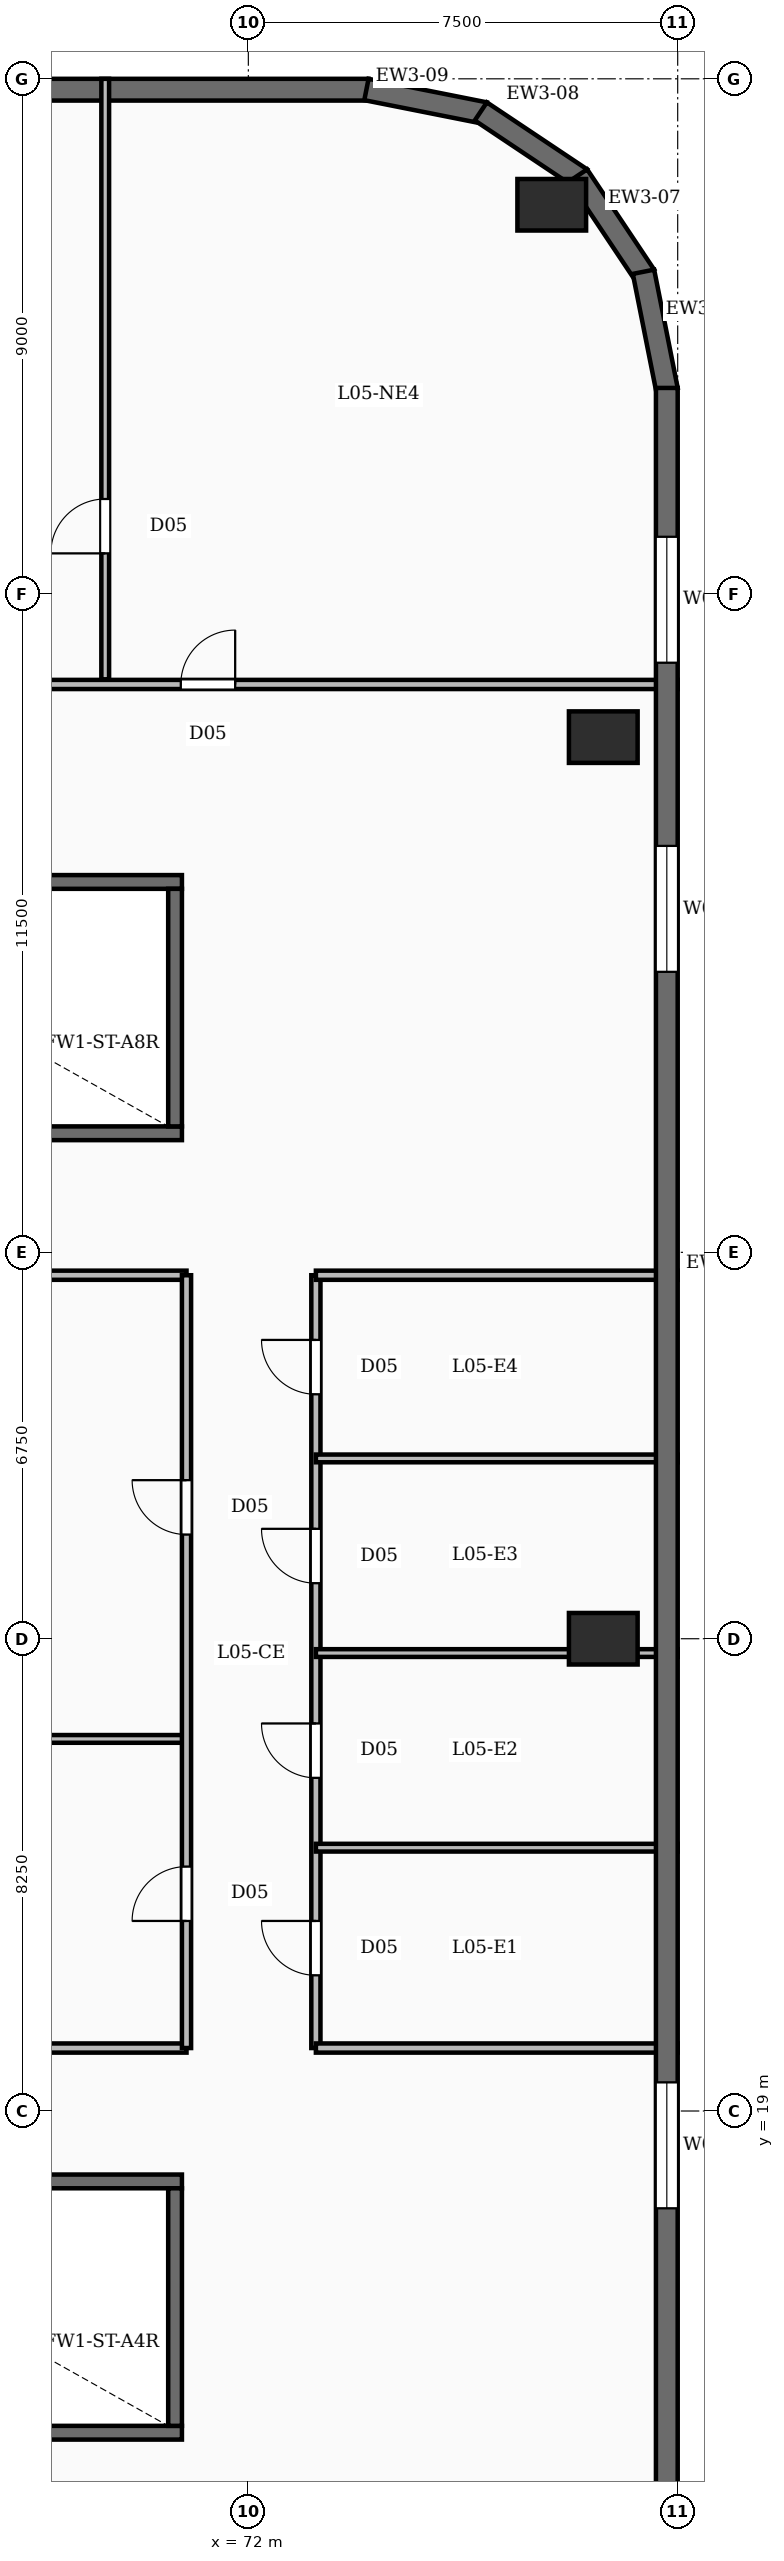
"""IFC4 building model, lengths in metres.
Left out: names, types, materials, properties, quantities, classifications, styles, units other than length and angle.
Written with IfcOpenShell. Run it as: python <this file> out.ifc"""

import sys

from ifc_helpers import new_model, si_unit, direction, frame, frame_2d, origin, origin_2d, place, context, subcontext, project, spatial, rectangle, extrude, element, fill, save


model = new_model("IFC4")
c1 = context("Model", 3, precision=1e-05, world=origin(), true_north=direction((0.0, 1.0)))
c2 = subcontext(c1, "Body", "Model", "MODEL_VIEW")
j1 = project(units=[si_unit("LENGTHUNIT", "METRE"), si_unit("PLANEANGLEUNIT", "RADIAN")], contexts=[c1])
p1 = place(None, origin())
s1 = spatial("IfcSite", under=j1, at=p1, CompositionType="ELEMENT")
p2 = place(p1, origin())
s2 = spatial("IfcBuilding", under=s1, at=p2, CompositionType="ELEMENT")
p3 = place(p2, frame((0.0, 0.0, 28.0)))
s3 = spatial("IfcBuildingStorey", under=s2, at=p3, CompositionType="ELEMENT", Elevation=28.0)
for number, where, z_axis, x_axis in (
    (1, (78.2, 27.25, -0.35), (0.0, 0.0, 1.0), (1.0, 0.0, 0.0)),
    (2, (78.2, 43.0, -0.35), (0.0, 0.0, 1.0), (1.0, 0.0, 0.0)),
    (3, (77.3, 52.3, -0.35), (0.0, 0.0, 1.0), (1.0, 0.0, 0.0)),
):
    element("IfcColumn", number, at=place(p3, frame(where, z_axis=z_axis, x_axis=x_axis)), inside=s3, PredefinedType="COLUMN", context=c2, shape_type="SweptSolid", body=[
        extrude(rectangle(XDim=1.2, YDim=0.9, at=origin_2d()), origin(), (0.0, 0.0, 1.0), 5.9),
    ])
p4 = place(p3, frame((79.31, 49.1, 0.0), z_axis=(0.0, 0.0, 1.0), x_axis=(0.0, -1.0, 0.0)))
e4 = element("IfcWall", 4, at=p4, inside=s3, PredefinedType="SOLIDWALL", context=c2, shape_type="SweptSolid", body=[
    extrude(rectangle(XDim=43.7, YDim=0.38, at=frame_2d((21.85, 0.0))), origin(), (0.0, 0.0, 1.0), 5.55),
])
p5 = place(p4, frame((2.6, 0.0, 0.95)))
e5 = element("IfcOpeningElement", 5, at=p5, cuts=e4, PredefinedType="OPENING", context=c2, shape_type="SweptSolid", body=[
    extrude(rectangle(XDim=2.2, YDim=2.5, at=frame_2d((1.1, 1.25))), frame((0.0, 0.2, 0.0), z_axis=(0.0, -1.0, 0.0), x_axis=(1.0, 0.0, 0.0)), (0.0, 0.0, 1.0), 0.4),
])
p6 = place(p4, frame((8.0, 0.0, 0.95)))
e6 = element("IfcOpeningElement", 6, at=p6, cuts=e4, PredefinedType="OPENING", context=c2, shape_type="SweptSolid", body=[
    extrude(rectangle(XDim=2.2, YDim=2.5, at=frame_2d((1.1, 1.25))), frame((0.0, 0.2, 0.0), z_axis=(0.0, -1.0, 0.0), x_axis=(1.0, 0.0, 0.0)), (0.0, 0.0, 1.0), 0.4),
])
p7 = place(p4, frame((29.6, 0.0, 0.95)))
e7 = element("IfcOpeningElement", 7, at=p7, cuts=e4, PredefinedType="OPENING", context=c2, shape_type="SweptSolid", body=[
    extrude(rectangle(XDim=2.2, YDim=2.5, at=frame_2d((1.1, 1.25))), frame((0.0, 0.2, 0.0), z_axis=(0.0, -1.0, 0.0), x_axis=(1.0, 0.0, 0.0)), (0.0, 0.0, 1.0), 0.4),
])
for number, where, z_axis, x_axis in (
    (8, (78.903, 51.129, 0.0), (0.0, 0.0, 1.0), (0.195, -0.981, 0.0)),
    (9, (77.76, 52.813, 0.0), (0.0, 0.0, 1.0), (0.556, -0.832, 0.0)),
    (10, (76.061, 53.931, 0.0), (0.0, 0.0, 1.0), (0.832, -0.556, 0.0)),
    (11, (74.063, 54.314, 0.0), (0.0, 0.0, 1.0), (0.981, -0.195, 0.0)),
):
    element("IfcWall", number, at=place(p3, frame(where, z_axis=z_axis, x_axis=x_axis)), inside=s3, PredefinedType="SOLIDWALL", context=c2, shape_type="SweptSolid", body=[
        extrude(rectangle(XDim=2.107, YDim=0.38, at=frame_2d((1.053, 0.0))), origin(), (0.0, 0.0, 1.0), 5.55),
    ])
p8 = place(p3, frame((5.4, 54.31, 0.0), z_axis=(0.0, 0.0, 1.0), x_axis=(1.0, 0.0, 0.0)))
e12 = element("IfcWall", 12, at=p8, inside=s3, PredefinedType="SOLIDWALL", context=c2, shape_type="SweptSolid", body=[
    extrude(rectangle(XDim=68.7, YDim=0.38, at=frame_2d((34.35, 0.0))), origin(), (0.0, 0.0, 1.0), 5.55),
])
p9 = place(p8, frame((24.2, 0.0, 0.95)))
e13 = element("IfcOpeningElement", 13, at=p9, cuts=e12, PredefinedType="OPENING", context=c2, shape_type="SweptSolid", body=[
    extrude(rectangle(XDim=2.2, YDim=2.5, at=frame_2d((1.1, 1.25))), frame((0.0, 0.2, 0.0), z_axis=(0.0, -1.0, 0.0), x_axis=(1.0, 0.0, 0.0)), (0.0, 0.0, 1.0), 0.4),
])
p10 = place(p8, frame((35.0, 0.0, 0.95)))
e14 = element("IfcOpeningElement", 14, at=p10, cuts=e12, PredefinedType="OPENING", context=c2, shape_type="SweptSolid", body=[
    extrude(rectangle(XDim=2.2, YDim=2.5, at=frame_2d((1.1, 1.25))), frame((0.0, 0.2, 0.0), z_axis=(0.0, -1.0, 0.0), x_axis=(1.0, 0.0, 0.0)), (0.0, 0.0, 1.0), 0.4),
])
p11 = place(p8, frame((40.4, 0.0, 0.95)))
e15 = element("IfcOpeningElement", 15, at=p11, cuts=e12, PredefinedType="OPENING", context=c2, shape_type="SweptSolid", body=[
    extrude(rectangle(XDim=2.2, YDim=2.5, at=frame_2d((1.1, 1.25))), frame((0.0, 0.2, 0.0), z_axis=(0.0, -1.0, 0.0), x_axis=(1.0, 0.0, 0.0)), (0.0, 0.0, 1.0), 0.4),
])
p12 = place(p8, frame((51.2, 0.0, 0.95)))
e16 = element("IfcOpeningElement", 16, at=p12, cuts=e12, PredefinedType="OPENING", context=c2, shape_type="SweptSolid", body=[
    extrude(rectangle(XDim=2.2, YDim=2.5, at=frame_2d((1.1, 1.25))), frame((0.0, 0.2, 0.0), z_axis=(0.0, -1.0, 0.0), x_axis=(1.0, 0.0, 0.0)), (0.0, 0.0, 1.0), 0.4),
])
p13 = place(p3, frame((60.96, 17.77, 0.0), z_axis=(0.0, 0.0, 1.0), x_axis=(1.0, 0.0, 0.0)))
e17 = element("IfcWall", 17, at=p13, inside=s3, PredefinedType="SOLIDWALL", context=c2, shape_type="SweptSolid", body=[
    extrude(rectangle(XDim=9.88, YDim=0.24, at=frame_2d((4.94, 0.0))), origin(), (0.0, 0.0, 1.0), 5.55),
])
p14 = place(p13, frame((0.69, 0.0, 0.0)))
e18 = element("IfcOpeningElement", 18, at=p14, cuts=e17, PredefinedType="OPENING", context=c2, shape_type="SweptSolid", body=[
    extrude(rectangle(XDim=1.1, YDim=2.15, at=frame_2d((0.55, 1.075))), frame((0.0, 0.13, 0.0), z_axis=(0.0, -1.0, 0.0), x_axis=(1.0, 0.0, 0.0)), (0.0, 0.0, 1.0), 0.26),
])
p15 = place(p3, frame((60.96, 13.38, 0.0), z_axis=(0.0, 0.0, 1.0), x_axis=(1.0, 0.0, 0.0)))
e19 = element("IfcWall", 19, at=p15, inside=s3, PredefinedType="SOLIDWALL", context=c2, shape_type="SweptSolid", body=[
    extrude(rectangle(XDim=9.88, YDim=0.24, at=frame_2d((4.94, 0.0))), origin(), (0.0, 0.0, 1.0), 5.55),
])
p16 = place(p3, frame((70.72, 13.5, 0.0), z_axis=(0.0, 0.0, 1.0), x_axis=(0.0, 1.0, 0.0)))
e20 = element("IfcWall", 20, at=p16, inside=s3, PredefinedType="SOLIDWALL", context=c2, shape_type="SweptSolid", body=[
    extrude(rectangle(XDim=4.15, YDim=0.24, at=frame_2d((2.075, 0.0))), origin(), (0.0, 0.0, 1.0), 5.55),
])
p17 = place(p3, frame((70.84, 36.08, 0.0), z_axis=(0.0, 0.0, 1.0), x_axis=(-1.0, 0.0, 0.0)))
e21 = element("IfcWall", 21, at=p17, inside=s3, PredefinedType="SOLIDWALL", context=c2, shape_type="SweptSolid", body=[
    extrude(rectangle(XDim=9.88, YDim=0.24, at=frame_2d((4.94, 0.0))), origin(), (0.0, 0.0, 1.0), 5.55),
])
p18 = place(p17, frame((8.09, 0.0, 0.0)))
e22 = element("IfcOpeningElement", 22, at=p18, cuts=e21, PredefinedType="OPENING", context=c2, shape_type="SweptSolid", body=[
    extrude(rectangle(XDim=1.1, YDim=2.15, at=frame_2d((0.55, 1.075))), frame((0.0, 0.13, 0.0), z_axis=(0.0, -1.0, 0.0), x_axis=(1.0, 0.0, 0.0)), (0.0, 0.0, 1.0), 0.26),
])
p19 = place(p3, frame((60.96, 40.47, 0.0), z_axis=(0.0, 0.0, 1.0), x_axis=(1.0, 0.0, 0.0)))
e23 = element("IfcWall", 23, at=p19, inside=s3, PredefinedType="SOLIDWALL", context=c2, shape_type="SweptSolid", body=[
    extrude(rectangle(XDim=9.88, YDim=0.24, at=frame_2d((4.94, 0.0))), origin(), (0.0, 0.0, 1.0), 5.55),
])
p20 = place(p3, frame((70.72, 36.2, 0.0), z_axis=(0.0, 0.0, 1.0), x_axis=(0.0, 1.0, 0.0)))
e24 = element("IfcWall", 24, at=p20, inside=s3, PredefinedType="SOLIDWALL", context=c2, shape_type="SweptSolid", body=[
    extrude(rectangle(XDim=4.15, YDim=0.24, at=frame_2d((2.075, 0.0))), origin(), (0.0, 0.0, 1.0), 5.55),
])
for number, where, z_axis, x_axis in (
    (25, (73.18, 23.6, 0.0), (0.0, 0.0, 1.0), (1.0, 0.0, 0.0)),
    (26, (73.18, 27.0, 0.0), (0.0, 0.0, 1.0), (1.0, 0.0, 0.0)),
    (27, (73.18, 30.4, 0.0), (0.0, 0.0, 1.0), (1.0, 0.0, 0.0)),
):
    element("IfcWall", number, at=place(p3, frame(where, z_axis=z_axis, x_axis=x_axis)), inside=s3, PredefinedType="PARTITIONING", context=c2, shape_type="SweptSolid", body=[
        extrude(rectangle(XDim=6.32, YDim=0.135, at=frame_2d((3.16, 0.0))), origin(), (0.0, 0.0, 1.0), 4.61),
    ])
p21 = place(p3, frame((60.88, 25.5, 0.0), z_axis=(0.0, 0.0, 1.0), x_axis=(1.0, 0.0, 0.0)))
e28 = element("IfcWall", 28, at=p21, inside=s3, PredefinedType="PARTITIONING", context=c2, shape_type="SweptSolid", body=[
    extrude(rectangle(XDim=10.04, YDim=0.135, at=frame_2d((5.02, 0.0))), origin(), (0.0, 0.0, 1.0), 4.61),
])
p22 = place(p3, frame((70.92, 20.1, 0.0), z_axis=(0.0, 0.0, 1.0), x_axis=(0.0, 1.0, 0.0)))
e29 = element("IfcWall", 29, at=p22, inside=s3, PredefinedType="PARTITIONING", context=c2, shape_type="SweptSolid", body=[
    extrude(rectangle(XDim=13.5, YDim=0.16, at=frame_2d((6.75, 0.0))), origin(), (0.0, 0.0, 1.0), 4.61),
])
p23 = place(p22, frame((2.22, 0.0, 0.0)))
e30 = element("IfcOpeningElement", 30, at=p23, cuts=e29, PredefinedType="OPENING", context=c2, shape_type="SweptSolid", body=[
    extrude(rectangle(XDim=0.95, YDim=2.15, at=frame_2d((0.475, 1.075))), frame((0.0, 0.09, 0.0), z_axis=(0.0, -1.0, 0.0), x_axis=(1.0, 0.0, 0.0)), (0.0, 0.0, 1.0), 0.18),
])
p24 = place(p22, frame((8.97, 0.0, 0.0)))
e31 = element("IfcOpeningElement", 31, at=p24, cuts=e29, PredefinedType="OPENING", context=c2, shape_type="SweptSolid", body=[
    extrude(rectangle(XDim=0.95, YDim=2.15, at=frame_2d((0.475, 1.075))), frame((0.0, 0.09, 0.0), z_axis=(0.0, -1.0, 0.0), x_axis=(1.0, 0.0, 0.0)), (0.0, 0.0, 1.0), 0.18),
])
p25 = place(p3, frame((73.18, 20.1, 0.0), z_axis=(0.0, 0.0, 1.0), x_axis=(0.0, 1.0, 0.0)))
e32 = element("IfcWall", 32, at=p25, inside=s3, PredefinedType="PARTITIONING", context=c2, shape_type="SweptSolid", body=[
    extrude(rectangle(XDim=13.5, YDim=0.16, at=frame_2d((6.75, 0.0))), origin(), (0.0, 0.0, 1.0), 4.61),
])
p26 = place(p25, frame((1.27, 0.0, 0.0)))
e33 = element("IfcOpeningElement", 33, at=p26, cuts=e32, PredefinedType="OPENING", context=c2, shape_type="SweptSolid", body=[
    extrude(rectangle(XDim=0.95, YDim=2.15, at=frame_2d((0.475, 1.075))), frame((0.0, 0.09, 0.0), z_axis=(0.0, -1.0, 0.0), x_axis=(1.0, 0.0, 0.0)), (0.0, 0.0, 1.0), 0.18),
])
p27 = place(p25, frame((4.72, 0.0, 0.0)))
e34 = element("IfcOpeningElement", 34, at=p27, cuts=e32, PredefinedType="OPENING", context=c2, shape_type="SweptSolid", body=[
    extrude(rectangle(XDim=0.95, YDim=2.15, at=frame_2d((0.475, 1.075))), frame((0.0, 0.09, 0.0), z_axis=(0.0, -1.0, 0.0), x_axis=(1.0, 0.0, 0.0)), (0.0, 0.0, 1.0), 0.18),
])
p28 = place(p25, frame((8.12, 0.0, 0.0)))
e35 = element("IfcOpeningElement", 35, at=p28, cuts=e32, PredefinedType="OPENING", context=c2, shape_type="SweptSolid", body=[
    extrude(rectangle(XDim=0.95, YDim=2.15, at=frame_2d((0.475, 1.075))), frame((0.0, 0.09, 0.0), z_axis=(0.0, -1.0, 0.0), x_axis=(1.0, 0.0, 0.0)), (0.0, 0.0, 1.0), 0.18),
])
p29 = place(p25, frame((11.42, 0.0, 0.0)))
e36 = element("IfcOpeningElement", 36, at=p29, cuts=e32, PredefinedType="OPENING", context=c2, shape_type="SweptSolid", body=[
    extrude(rectangle(XDim=0.95, YDim=2.15, at=frame_2d((0.475, 1.075))), frame((0.0, 0.09, 0.0), z_axis=(0.0, -1.0, 0.0), x_axis=(1.0, 0.0, 0.0)), (0.0, 0.0, 1.0), 0.18),
])
p30 = place(p3, frame((60.88, 20.1, 0.0), z_axis=(0.0, 0.0, 1.0), x_axis=(1.0, 0.0, 0.0)))
e37 = element("IfcWall", 37, at=p30, inside=s3, PredefinedType="PARTITIONING", context=c2, shape_type="SweptSolid", body=[
    extrude(rectangle(XDim=10.04, YDim=0.16, at=frame_2d((5.02, 0.0))), origin(), (0.0, 0.0, 1.0), 3.6),
])
p31 = place(p3, frame((60.88, 33.6, 0.0), z_axis=(0.0, 0.0, 1.0), x_axis=(1.0, 0.0, 0.0)))
e38 = element("IfcWall", 38, at=p31, inside=s3, PredefinedType="PARTITIONING", context=c2, shape_type="SweptSolid", body=[
    extrude(rectangle(XDim=10.04, YDim=0.16, at=frame_2d((5.02, 0.0))), origin(), (0.0, 0.0, 1.0), 4.61),
])
p32 = place(p3, frame((73.18, 20.1, 0.0), z_axis=(0.0, 0.0, 1.0), x_axis=(1.0, 0.0, 0.0)))
e39 = element("IfcWall", 39, at=p32, inside=s3, PredefinedType="PARTITIONING", context=c2, shape_type="SweptSolid", body=[
    extrude(rectangle(XDim=6.32, YDim=0.16, at=frame_2d((3.16, 0.0))), origin(), (0.0, 0.0, 1.0), 3.6),
])
p33 = place(p3, frame((73.18, 33.6, 0.0), z_axis=(0.0, 0.0, 1.0), x_axis=(1.0, 0.0, 0.0)))
e40 = element("IfcWall", 40, at=p33, inside=s3, PredefinedType="PARTITIONING", context=c2, shape_type="SweptSolid", body=[
    extrude(rectangle(XDim=6.32, YDim=0.16, at=frame_2d((3.16, 0.0))), origin(), (0.0, 0.0, 1.0), 4.61),
])
p34 = place(p3, frame((69.5, 44.01, 0.0), z_axis=(0.0, 0.0, 1.0), x_axis=(0.0, 1.0, 0.0)))
e41 = element("IfcWall", 41, at=p34, inside=s3, PredefinedType="PARTITIONING", context=c2, shape_type="SweptSolid", body=[
    extrude(rectangle(XDim=10.49, YDim=0.135, at=frame_2d((5.245, 0.0))), origin(), (0.0, 0.0, 1.0), 4.61),
])
p35 = place(p34, frame((2.2, 0.0, 0.0)))
e42 = element("IfcOpeningElement", 42, at=p35, cuts=e41, PredefinedType="OPENING", context=c2, shape_type="SweptSolid", body=[
    extrude(rectangle(XDim=0.95, YDim=2.15, at=frame_2d((0.475, 1.075))), frame((0.0, 0.077, 0.0), z_axis=(0.0, -1.0, 0.0), x_axis=(1.0, 0.0, 0.0)), (0.0, 0.0, 1.0), 0.155),
])
p36 = place(p3, frame((49.8, 43.92, 0.0), z_axis=(0.0, 0.0, 1.0), x_axis=(1.0, 0.0, 0.0)))
e43 = element("IfcWall", 43, at=p36, inside=s3, PredefinedType="PARTITIONING", context=c2, shape_type="SweptSolid", body=[
    extrude(rectangle(XDim=29.7, YDim=0.16, at=frame_2d((14.85, 0.0))), origin(), (0.0, 0.0, 1.0), 4.61),
])
p37 = place(p36, frame((2.62, 0.0, 0.0)))
e44 = element("IfcOpeningElement", 44, at=p37, cuts=e43, PredefinedType="OPENING", context=c2, shape_type="SweptSolid", body=[
    extrude(rectangle(XDim=0.95, YDim=2.15, at=frame_2d((0.475, 1.075))), frame((0.0, 0.09, 0.0), z_axis=(0.0, -1.0, 0.0), x_axis=(1.0, 0.0, 0.0)), (0.0, 0.0, 1.0), 0.18),
])
p38 = place(p36, frame((7.85, 0.0, 0.0)))
e45 = element("IfcOpeningElement", 45, at=p38, cuts=e43, PredefinedType="OPENING", context=c2, shape_type="SweptSolid", body=[
    extrude(rectangle(XDim=0.95, YDim=2.15, at=frame_2d((0.475, 1.075))), frame((0.0, 0.09, 0.0), z_axis=(0.0, -1.0, 0.0), x_axis=(1.0, 0.0, 0.0)), (0.0, 0.0, 1.0), 0.18),
])
p39 = place(p36, frame((16.718, 0.0, 0.0)))
e46 = element("IfcOpeningElement", 46, at=p39, cuts=e43, PredefinedType="OPENING", context=c2, shape_type="SweptSolid", body=[
    extrude(rectangle(XDim=0.95, YDim=2.15, at=frame_2d((0.475, 1.075))), frame((0.0, 0.09, 0.0), z_axis=(0.0, -1.0, 0.0), x_axis=(1.0, 0.0, 0.0)), (0.0, 0.0, 1.0), 0.18),
])
p40 = place(p36, frame((21.02, 0.0, 0.0)))
e47 = element("IfcOpeningElement", 47, at=p40, cuts=e43, PredefinedType="OPENING", context=c2, shape_type="SweptSolid", body=[
    extrude(rectangle(XDim=0.95, YDim=2.15, at=frame_2d((0.475, 1.075))), frame((0.0, 0.09, 0.0), z_axis=(0.0, -1.0, 0.0), x_axis=(1.0, 0.0, 0.0)), (0.0, 0.0, 1.0), 0.18),
])
p41 = place(p5, origin())
e48 = element("IfcWindow", 48, at=p41, inside=s3, PartitioningType="DOUBLE_PANEL_VERTICAL", PredefinedType="WINDOW", context=c2, shape_type="SweptSolid", body=[
    extrude(rectangle(XDim=2.2, YDim=2.5, at=frame_2d((1.1, 1.25))), frame((0.0, 0.03, 0.0), z_axis=(0.0, -1.0, 0.0), x_axis=(1.0, 0.0, 0.0)), (0.0, 0.0, 1.0), 0.06),
])
fill(e5, e48)
p42 = place(p6, origin())
e49 = element("IfcWindow", 49, at=p42, inside=s3, PartitioningType="DOUBLE_PANEL_VERTICAL", PredefinedType="WINDOW", context=c2, shape_type="SweptSolid", body=[
    extrude(rectangle(XDim=2.2, YDim=2.5, at=frame_2d((1.1, 1.25))), frame((0.0, 0.03, 0.0), z_axis=(0.0, -1.0, 0.0), x_axis=(1.0, 0.0, 0.0)), (0.0, 0.0, 1.0), 0.06),
])
fill(e6, e49)
p43 = place(p7, origin())
e50 = element("IfcWindow", 50, at=p43, inside=s3, PartitioningType="DOUBLE_PANEL_VERTICAL", PredefinedType="WINDOW", context=c2, shape_type="SweptSolid", body=[
    extrude(rectangle(XDim=2.2, YDim=2.5, at=frame_2d((1.1, 1.25))), frame((0.0, 0.03, 0.0), z_axis=(0.0, -1.0, 0.0), x_axis=(1.0, 0.0, 0.0)), (0.0, 0.0, 1.0), 0.06),
])
fill(e7, e50)
p44 = place(p23, origin())
e51 = element("IfcDoor", 51, at=p44, inside=s3, OperationType="SINGLE_SWING_LEFT", PredefinedType="DOOR", context=c2, shape_type="SweptSolid", body=[
    extrude(rectangle(XDim=0.95, YDim=2.15, at=frame_2d((0.475, 1.075))), frame((0.0, 0.025, 0.0), z_axis=(0.0, -1.0, 0.0), x_axis=(1.0, 0.0, 0.0)), (0.0, 0.0, 1.0), 0.05),
])
fill(e30, e51)
p45 = place(p24, origin())
e52 = element("IfcDoor", 52, at=p45, inside=s3, OperationType="SINGLE_SWING_RIGHT", PredefinedType="DOOR", context=c2, shape_type="SweptSolid", body=[
    extrude(rectangle(XDim=0.95, YDim=2.15, at=frame_2d((0.475, 1.075))), frame((0.0, 0.025, 0.0), z_axis=(0.0, -1.0, 0.0), x_axis=(1.0, 0.0, 0.0)), (0.0, 0.0, 1.0), 0.05),
])
fill(e31, e52)
p46 = place(p26, origin())
e53 = element("IfcDoor", 53, at=p46, inside=s3, OperationType="SINGLE_SWING_RIGHT", PredefinedType="DOOR", context=c2, shape_type="SweptSolid", body=[
    extrude(rectangle(XDim=0.95, YDim=2.15, at=frame_2d((0.475, 1.075))), frame((0.0, 0.025, 0.0), z_axis=(0.0, -1.0, 0.0), x_axis=(1.0, 0.0, 0.0)), (0.0, 0.0, 1.0), 0.05),
])
fill(e33, e53)
p47 = place(p27, origin())
e54 = element("IfcDoor", 54, at=p47, inside=s3, OperationType="SINGLE_SWING_RIGHT", PredefinedType="DOOR", context=c2, shape_type="SweptSolid", body=[
    extrude(rectangle(XDim=0.95, YDim=2.15, at=frame_2d((0.475, 1.075))), frame((0.0, 0.025, 0.0), z_axis=(0.0, -1.0, 0.0), x_axis=(1.0, 0.0, 0.0)), (0.0, 0.0, 1.0), 0.05),
])
fill(e34, e54)
p48 = place(p28, origin())
e55 = element("IfcDoor", 55, at=p48, inside=s3, OperationType="SINGLE_SWING_RIGHT", PredefinedType="DOOR", context=c2, shape_type="SweptSolid", body=[
    extrude(rectangle(XDim=0.95, YDim=2.15, at=frame_2d((0.475, 1.075))), frame((0.0, 0.025, 0.0), z_axis=(0.0, -1.0, 0.0), x_axis=(1.0, 0.0, 0.0)), (0.0, 0.0, 1.0), 0.05),
])
fill(e35, e55)
p49 = place(p29, origin())
e56 = element("IfcDoor", 56, at=p49, inside=s3, OperationType="SINGLE_SWING_RIGHT", PredefinedType="DOOR", context=c2, shape_type="SweptSolid", body=[
    extrude(rectangle(XDim=0.95, YDim=2.15, at=frame_2d((0.475, 1.075))), frame((0.0, 0.025, 0.0), z_axis=(0.0, -1.0, 0.0), x_axis=(1.0, 0.0, 0.0)), (0.0, 0.0, 1.0), 0.05),
])
fill(e36, e56)
p50 = place(p35, origin())
e57 = element("IfcDoor", 57, at=p50, inside=s3, OperationType="SINGLE_SWING_LEFT", PredefinedType="DOOR", context=c2, shape_type="SweptSolid", body=[
    extrude(rectangle(XDim=0.95, YDim=2.15, at=frame_2d((0.475, 1.075))), frame((0.0, 0.025, 0.0), z_axis=(0.0, -1.0, 0.0), x_axis=(1.0, 0.0, 0.0)), (0.0, 0.0, 1.0), 0.05),
])
fill(e42, e57)
p51 = place(p40, origin())
e58 = element("IfcDoor", 58, at=p51, inside=s3, OperationType="SINGLE_SWING_RIGHT", PredefinedType="DOOR", context=c2, shape_type="SweptSolid", body=[
    extrude(rectangle(XDim=0.95, YDim=2.15, at=frame_2d((0.475, 1.075))), frame((0.0, 0.025, 0.0), z_axis=(0.0, -1.0, 0.0), x_axis=(1.0, 0.0, 0.0)), (0.0, 0.0, 1.0), 0.05),
])
fill(e47, e58)
save(model, sys.argv[1])
